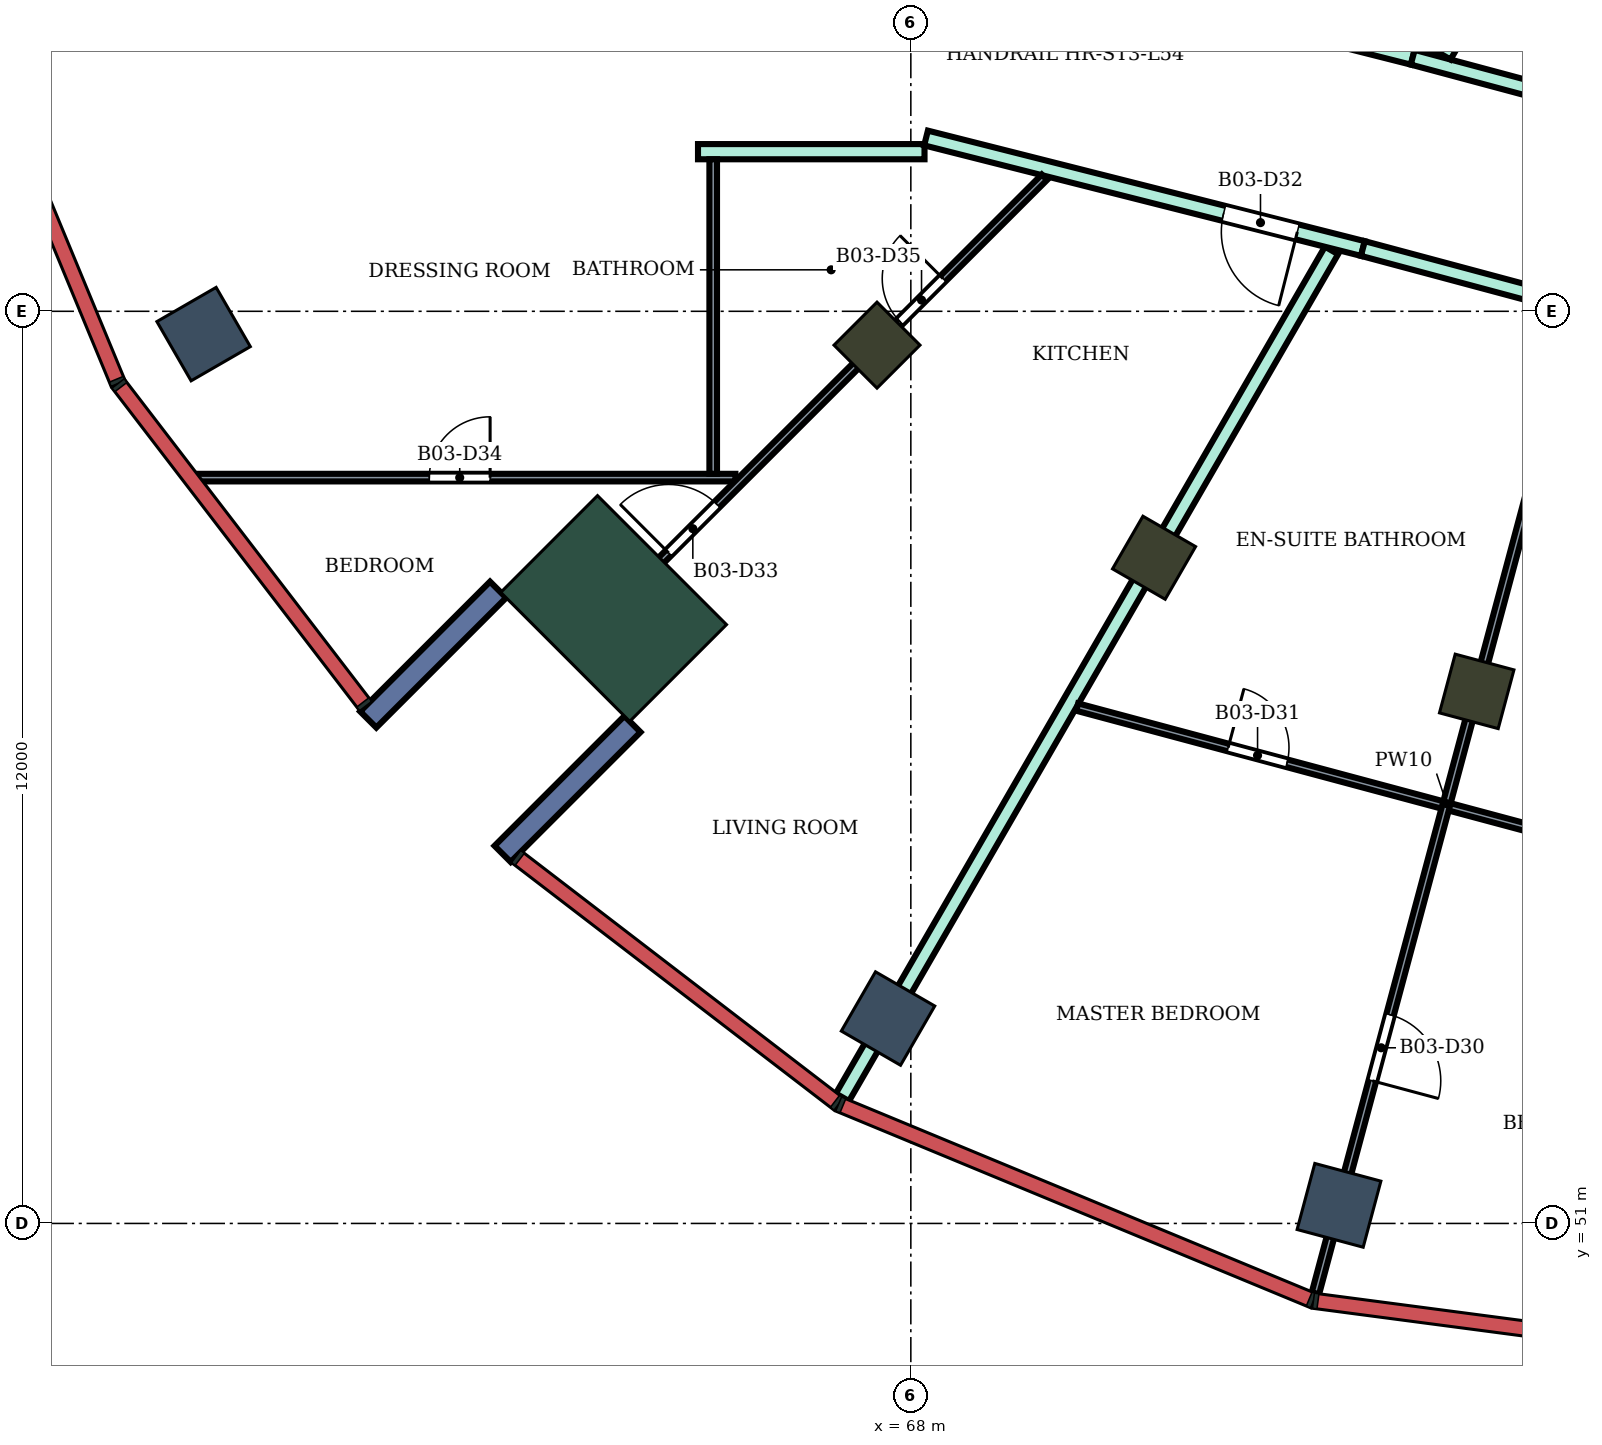
"""IFC4 building model, lengths in metres.
Left out: names, types, materials, properties, quantities, classifications, styles, units other than length and angle.
Written with IfcOpenShell. Run it as: python <this file> out.ifc"""

import sys

from ifc_helpers import new_model, si_unit, direction, frame, frame_2d, origin, origin_2d, place, context, subcontext, project, spatial, rectangle, extrude, element, fill, save


model = new_model("IFC4")
c1 = context("Model", 3, precision=1e-05, world=origin(), true_north=direction((0.0, 1.0)))
c2 = subcontext(c1, "Body", "Model", "MODEL_VIEW")
j1 = project(units=[si_unit("LENGTHUNIT", "METRE"), si_unit("PLANEANGLEUNIT", "RADIAN")], contexts=[c1])
p1 = place(None, origin())
s1 = spatial("IfcSite", under=j1, at=p1, CompositionType="ELEMENT")
p2 = place(p1, origin())
s2 = spatial("IfcBuilding", under=s1, at=p2, CompositionType="ELEMENT")
p3 = place(p2, frame((0.0, 0.0, 237.3)))
s3 = spatial("IfcBuildingStorey", under=s2, at=p3, CompositionType="ELEMENT", Elevation=237.3)
for number, where, z_axis, x_axis in (
    (1, (58.696, 62.7, 0.0), (0.0, 0.0, 1.0), (-0.866, -0.5, 0.0)),
    (2, (67.7, 53.696, 0.0), (0.0, 0.0, 1.0), (-0.5, -0.866, 0.0)),
    (3, (73.633, 51.238, 0.0), (0.0, 0.0, 1.0), (-0.259, -0.966, 0.0)),
):
    element("IfcColumn", number, at=place(p3, frame(where, z_axis=z_axis, x_axis=x_axis)), inside=s3, PredefinedType="COLUMN", context=c2, shape_type="SweptSolid", body=[
        extrude(rectangle(XDim=0.9, YDim=0.9, at=origin_2d()), origin(), (0.0, 0.0, 1.0), 4.2),
    ])
for number, where, z_axis, x_axis in (
    (4, (67.555, 62.555, 0.0), (0.0, 0.0, 1.0), (-0.707, -0.707, 0.0)),
    (5, (71.2, 59.758, 0.0), (0.0, 0.0, 1.0), (-0.5, -0.866, 0.0)),
    (6, (75.445, 58.0, 0.0), (0.0, 0.0, 1.0), (-0.259, -0.966, 0.0)),
):
    element("IfcColumn", number, at=place(p3, frame(where, z_axis=z_axis, x_axis=x_axis)), inside=s3, PredefinedType="COLUMN", context=c2, shape_type="SweptSolid", body=[
        extrude(rectangle(XDim=0.8, YDim=0.8, at=origin_2d()), origin(), (0.0, 0.0, 1.0), 4.2),
    ])
p4 = place(p3, frame((64.09, 59.09, 0.0), z_axis=(0.0, 0.0, 1.0), x_axis=(-0.707106781187, -0.707106781187, 0.0)))
e7 = element("IfcColumn", 7, at=p4, inside=s3, PredefinedType="COLUMN", context=c2, shape_type="SweptSolid", body=[
    extrude(rectangle(XDim=1.8, YDim=2.4, at=origin_2d()), origin(), (0.0, 0.0, 1.0), 4.2),
])
for number, where, z_axis, x_axis in (
    (8, (62.57, 59.338, 0.0), (0.0, 0.0, 1.0), (-0.707, -0.707, 0.0)),
    (9, (64.338, 57.57, 0.0), (0.0, 0.0, 1.0), (-0.707, -0.707, 0.0)),
):
    element("IfcWall", number, at=place(p3, frame(where, z_axis=z_axis, x_axis=x_axis)), inside=s3, PredefinedType="NOTDEFINED", context=c2, shape_type="SweptSolid", body=[
        extrude(rectangle(XDim=2.416, YDim=0.3, at=frame_2d((1.208, 0.0))), origin(), (0.0, 0.0, 1.0), 4.2),
    ])
p5 = place(p3, frame((65.2, 65.1, 0.0), z_axis=(0.0, 0.0, 1.0), x_axis=(1.0, 0.0, 0.0)))
e10 = element("IfcWall", 10, at=p5, inside=s3, PredefinedType="PARTITIONING", context=c2, shape_type="SweptSolid", body=[
    extrude(rectangle(XDim=2.98, YDim=0.2, at=frame_2d((1.49, 0.0))), origin(), (0.0, 0.0, 1.0), 3.75),
])
p6 = place(p3, frame((67.1, 52.659, 0.0), z_axis=(0.0, 0.0, 1.0), x_axis=(0.500128690501, 0.865951091539, 0.0)))
e11 = element("IfcWall", 11, at=p6, inside=s3, PredefinedType="PARTITIONING", context=c2, shape_type="SweptSolid", body=[
    extrude(rectangle(XDim=12.866, YDim=0.2, at=frame_2d((6.433, 0.0))), origin(), (0.0, 0.0, 1.0), 3.75),
])
p7 = place(p3, frame((68.2, 65.28, 0.0), z_axis=(0.0, 0.0, 1.0), x_axis=(0.969450596516, -0.245286650503, 0.0)))
e12 = element("IfcWall", 12, at=p7, inside=s3, PredefinedType="PARTITIONING", context=c2, shape_type="SweptSolid", body=[
    extrude(rectangle(XDim=5.928, YDim=0.2, at=frame_2d((2.964, 0.0))), origin(), (0.0, 0.0, 1.0), 3.75),
])
p8 = place(p7, frame((4.039, 0.0, 0.0)))
e13 = element("IfcOpeningElement", 13, at=p8, cuts=e12, PredefinedType="OPENING", context=c2, shape_type="SweptSolid", body=[
    extrude(rectangle(XDim=1.0, YDim=2.1, at=frame_2d((0.5, 1.05))), frame((0.0, 0.11, 0.0), z_axis=(0.0, -1.0, 0.0), x_axis=(1.0, 0.0, 0.0)), (0.0, 0.0, 1.0), 0.22),
])
p9 = place(p3, frame((72.1, 66.975, 0.0), z_axis=(0.0, 0.0, 1.0), x_axis=(0.969471314457, -0.245204752086, 0.0)))
e14 = element("IfcWall", 14, at=p9, inside=s3, PredefinedType="PARTITIONING", context=c2, shape_type="SweptSolid", body=[
    extrude(rectangle(XDim=2.582, YDim=0.2, at=frame_2d((1.291, 0.0))), origin(), (0.0, 0.0, 1.0), 3.75),
])
p10 = place(p9, frame((0.841, 0.0, 0.0)))
e15 = element("IfcOpeningElement", 15, at=p10, cuts=e14, PredefinedType="OPENING", context=c2, shape_type="SweptSolid", body=[
    extrude(rectangle(XDim=0.9, YDim=2.1, at=frame_2d((0.45, 1.05))), frame((0.0, 0.11, 0.0), z_axis=(0.0, -1.0, 0.0), x_axis=(1.0, 0.0, 0.0)), (0.0, 0.0, 1.0), 0.22),
])
p11 = place(p3, frame((73.947, 63.826, 0.0), z_axis=(0.0, 0.0, 1.0), x_axis=(0.965908253407, -0.258884619088, 0.0)))
e16 = element("IfcWall", 16, at=p11, inside=s3, PredefinedType="PARTITIONING", context=c2, shape_type="SweptSolid", body=[
    extrude(rectangle(XDim=6.217, YDim=0.2, at=frame_2d((3.108, 0.0))), origin(), (0.0, 0.0, 1.0), 3.75),
])
p12 = place(p3, frame((74.603, 66.342, 0.0), z_axis=(0.0, 0.0, 1.0), x_axis=(0.965920893652, -0.258837453254, 0.0)))
e17 = element("IfcWall", 17, at=p12, inside=s3, PredefinedType="PARTITIONING", context=c2, shape_type="SweptSolid", body=[
    extrude(rectangle(XDim=5.458, YDim=0.2, at=frame_2d((2.729, 0.0))), origin(), (0.0, 0.0, 1.0), 3.75),
])
p13 = place(p12, frame((2.512, 0.0, 0.0)))
e18 = element("IfcOpeningElement", 18, at=p13, cuts=e17, PredefinedType="OPENING", context=c2, shape_type="SweptSolid", body=[
    extrude(rectangle(XDim=0.9, YDim=2.1, at=frame_2d((0.45, 1.05))), frame((0.0, 0.11, 0.0), z_axis=(0.0, -1.0, 0.0), x_axis=(1.0, 0.0, 0.0)), (0.0, 0.0, 1.0), 0.22),
])
p14 = place(p3, frame((75.014, 66.362, 0.0), z_axis=(0.0, 0.0, 1.0), x_axis=(0.500097042406, 0.865969369075, 0.0)))
e19 = element("IfcWall", 19, at=p14, inside=s3, PredefinedType="PARTITIONING", context=c2, shape_type="SweptSolid", body=[
    extrude(rectangle(XDim=2.275, YDim=0.2, at=frame_2d((1.138, 0.0))), origin(), (0.0, 0.0, 1.0), 3.75),
])
p15 = place(p3, frame((58.6, 60.812, 0.0), z_axis=(0.0, 0.0, 1.0), x_axis=(1.0, 0.0, 0.0)))
e20 = element("IfcWall", 20, at=p15, inside=s3, PredefinedType="PARTITIONING", context=c2, shape_type="SweptSolid", body=[
    extrude(rectangle(XDim=7.092, YDim=0.1, at=frame_2d((3.546, 0.0))), origin(), (0.0, 0.0, 1.0), 3.75),
])
p16 = place(p15, frame((3.065, 0.0, 0.0)))
e21 = element("IfcOpeningElement", 21, at=p16, cuts=e20, PredefinedType="OPENING", context=c2, shape_type="SweptSolid", body=[
    extrude(rectangle(XDim=0.8, YDim=2.1, at=frame_2d((0.4, 1.05))), frame((0.0, 0.06, 0.0), z_axis=(0.0, -1.0, 0.0), x_axis=(1.0, 0.0, 0.0)), (0.0, 0.0, 1.0), 0.12),
])
p17 = place(p3, frame((63.591, 58.6, 0.0), z_axis=(0.0, 0.0, 1.0), x_axis=(0.707274766636, 0.70693875582, 0.0)))
e22 = element("IfcWall", 22, at=p17, inside=s3, PredefinedType="PARTITIONING", context=c2, shape_type="SweptSolid", body=[
    extrude(rectangle(XDim=8.719, YDim=0.1, at=frame_2d((4.359, 0.0))), origin(), (0.0, 0.0, 1.0), 3.75),
])
p18 = place(p17, frame((1.729, 0.0, 0.0)))
e23 = element("IfcOpeningElement", 23, at=p18, cuts=e22, PredefinedType="OPENING", context=c2, shape_type="SweptSolid", body=[
    extrude(rectangle(XDim=0.9, YDim=2.1, at=frame_2d((0.45, 1.05))), frame((0.0, 0.06, 0.0), z_axis=(0.0, -1.0, 0.0), x_axis=(1.0, 0.0, 0.0)), (0.0, 0.0, 1.0), 0.12),
])
p19 = place(p17, frame((6.033, 0.0, 0.0)))
e24 = element("IfcOpeningElement", 24, at=p19, cuts=e22, PredefinedType="OPENING", context=c2, shape_type="SweptSolid", body=[
    extrude(rectangle(XDim=0.8, YDim=2.1, at=frame_2d((0.4, 1.05))), frame((0.0, 0.06, 0.0), z_axis=(0.0, -1.0, 0.0), x_axis=(1.0, 0.0, 0.0)), (0.0, 0.0, 1.0), 0.12),
])
p20 = place(p3, frame((65.4, 60.862, 0.0), z_axis=(0.0, 0.0, 1.0), x_axis=(0.0, 1.0, 0.0)))
e25 = element("IfcWall", 25, at=p20, inside=s3, PredefinedType="PARTITIONING", context=c2, shape_type="SweptSolid", body=[
    extrude(rectangle(XDim=4.138, YDim=0.1, at=frame_2d((2.069, 0.0))), origin(), (0.0, 0.0, 1.0), 3.75),
])
p21 = place(p3, frame((70.188, 57.793, 0.0), z_axis=(0.0, 0.0, 1.0), x_axis=(0.965911138035, -0.258873856194, 0.0)))
e26 = element("IfcWall", 26, at=p21, inside=s3, PredefinedType="PARTITIONING", context=c2, shape_type="SweptSolid", body=[
    extrude(rectangle(XDim=10.098, YDim=0.1, at=frame_2d((5.049, 0.0))), origin(), (0.0, 0.0, 1.0), 3.75),
])
p22 = place(p21, frame((2.057, 0.0, 0.0)))
e27 = element("IfcOpeningElement", 27, at=p22, cuts=e26, PredefinedType="OPENING", context=c2, shape_type="SweptSolid", body=[
    extrude(rectangle(XDim=0.8, YDim=2.1, at=frame_2d((0.4, 1.05))), frame((0.0, 0.06, 0.0), z_axis=(0.0, -1.0, 0.0), x_axis=(1.0, 0.0, 0.0)), (0.0, 0.0, 1.0), 0.12),
])
p23 = place(p3, frame((73.323, 50.081, 0.0), z_axis=(0.0, 0.0, 1.0), x_axis=(0.258837030899, 0.96592100683, 0.0)))
e28 = element("IfcWall", 28, at=p23, inside=s3, PredefinedType="PARTITIONING", context=c2, shape_type="SweptSolid", body=[
    extrude(rectangle(XDim=13.338, YDim=0.1, at=frame_2d((6.669, 0.0))), origin(), (0.0, 0.0, 1.0), 3.75),
])
p24 = place(p23, frame((2.894, 0.0, 0.0)))
e29 = element("IfcOpeningElement", 29, at=p24, cuts=e28, PredefinedType="OPENING", context=c2, shape_type="SweptSolid", body=[
    extrude(rectangle(XDim=0.9, YDim=2.1, at=frame_2d((0.45, 1.05))), frame((0.0, 0.06, 0.0), z_axis=(0.0, -1.0, 0.0), x_axis=(1.0, 0.0, 0.0)), (0.0, 0.0, 1.0), 0.12),
])
p25 = place(p24, frame((0.9, 0.0, 0.0), z_axis=(0.0, 0.0, 1.0), x_axis=(-1.0, 0.0, 0.0)))
e30 = element("IfcDoor", 30, at=p25, inside=s3, OperationType="SINGLE_SWING_RIGHT", PredefinedType="DOOR", context=c2, shape_type="SweptSolid", body=[
    extrude(rectangle(XDim=0.9, YDim=2.1, at=frame_2d((0.45, 1.05))), frame((0.0, 0.025, 0.0), z_axis=(0.0, -1.0, 0.0), x_axis=(1.0, 0.0, 0.0)), (0.0, 0.0, 1.0), 0.05),
])
fill(e29, e30)
p26 = place(p22, origin())
e31 = element("IfcDoor", 31, at=p26, inside=s3, OperationType="SINGLE_SWING_LEFT", PredefinedType="DOOR", context=c2, shape_type="SweptSolid", body=[
    extrude(rectangle(XDim=0.8, YDim=2.1, at=frame_2d((0.4, 1.05))), frame((0.0, 0.025, 0.0), z_axis=(0.0, -1.0, 0.0), x_axis=(1.0, 0.0, 0.0)), (0.0, 0.0, 1.0), 0.05),
])
fill(e27, e31)
p27 = place(p8, frame((1.0, 0.0, 0.0), z_axis=(0.0, 0.0, 1.0), x_axis=(-1.0, 0.0, 0.0)))
e32 = element("IfcDoor", 32, at=p27, inside=s3, OperationType="SINGLE_SWING_LEFT", PredefinedType="DOOR", context=c2, shape_type="SweptSolid", body=[
    extrude(rectangle(XDim=1.0, YDim=2.1, at=frame_2d((0.5, 1.05))), frame((0.0, 0.025, 0.0), z_axis=(0.0, -1.0, 0.0), x_axis=(1.0, 0.0, 0.0)), (0.0, 0.0, 1.0), 0.05),
])
fill(e13, e32)
p28 = place(p18, origin())
e33 = element("IfcDoor", 33, at=p28, inside=s3, OperationType="SINGLE_SWING_LEFT", PredefinedType="DOOR", context=c2, shape_type="SweptSolid", body=[
    extrude(rectangle(XDim=0.9, YDim=2.1, at=frame_2d((0.45, 1.05))), frame((0.0, 0.025, 0.0), z_axis=(0.0, -1.0, 0.0), x_axis=(1.0, 0.0, 0.0)), (0.0, 0.0, 1.0), 0.05),
])
fill(e23, e33)
p29 = place(p16, origin())
e34 = element("IfcDoor", 34, at=p29, inside=s3, OperationType="SINGLE_SWING_RIGHT", PredefinedType="DOOR", context=c2, shape_type="SweptSolid", body=[
    extrude(rectangle(XDim=0.8, YDim=2.1, at=frame_2d((0.4, 1.05))), frame((0.0, 0.025, 0.0), z_axis=(0.0, -1.0, 0.0), x_axis=(1.0, 0.0, 0.0)), (0.0, 0.0, 1.0), 0.05),
])
fill(e21, e34)
p30 = place(p19, origin())
e35 = element("IfcDoor", 35, at=p30, inside=s3, OperationType="SINGLE_SWING_RIGHT", PredefinedType="DOOR", context=c2, shape_type="SweptSolid", body=[
    extrude(rectangle(XDim=0.8, YDim=2.1, at=frame_2d((0.4, 1.05))), frame((0.0, 0.025, 0.0), z_axis=(0.0, -1.0, 0.0), x_axis=(1.0, 0.0, 0.0)), (0.0, 0.0, 1.0), 0.05),
])
fill(e24, e35)
save(model, sys.argv[1])
